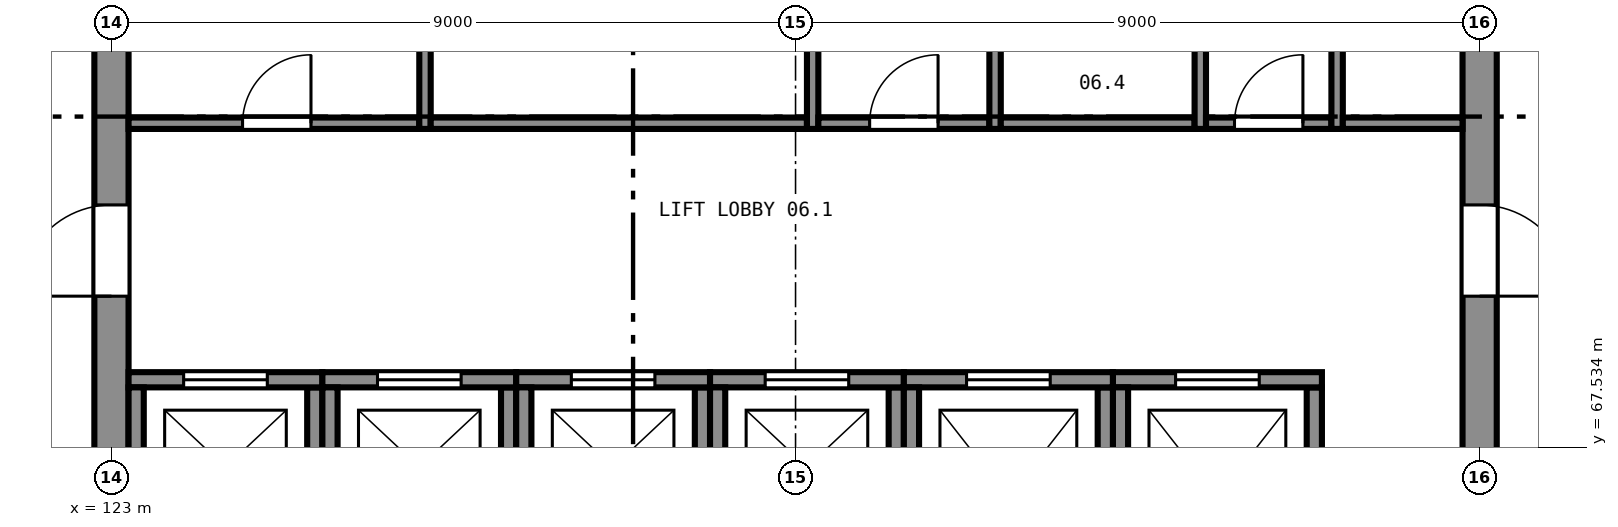
"""IFC4 building model, lengths in metres.
Left out: names, types, materials, properties, quantities, classifications, styles, units other than length and angle.
Written with IfcOpenShell. Run it as: python <this file> out.ifc"""

import sys

from ifc_helpers import new_model, si_unit, direction, frame, frame_2d, origin, place, context, subcontext, project, spatial, rectangle, extrude, element, fill, save


model = new_model("IFC4")
c1 = context("Model", 3, precision=1e-05, world=origin(), true_north=direction((0.0, 1.0)))
c2 = subcontext(c1, "Body", "Model", "MODEL_VIEW")
j1 = project(units=[si_unit("LENGTHUNIT", "METRE"), si_unit("PLANEANGLEUNIT", "RADIAN")], contexts=[c1])
p1 = place(None, origin())
s1 = spatial("IfcSite", under=j1, at=p1, CompositionType="ELEMENT")
p2 = place(p1, origin())
s2 = spatial("IfcBuilding", under=s1, at=p2, CompositionType="ELEMENT")
p3 = place(p2, frame((0.0, 0.0, 25.5)))
s3 = spatial("IfcBuildingStorey", under=s2, at=p3, CompositionType="ELEMENT", Elevation=25.5)
p4 = place(p3, frame((141.0, 65.225, 0.0), z_axis=(0.0, 0.0, 1.0), x_axis=(0.0, 1.0, 0.0)))
e1 = element("IfcWall", 1, at=p4, inside=s3, PredefinedType="SHEAR", context=c2, shape_type="SweptSolid", body=[
    extrude(rectangle(XDim=17.55, YDim=0.45, at=frame_2d((8.775, 0.0))), origin(), (0.0, 0.0, 1.0), 4.0),
])
p5 = place(p4, frame((4.3, 0.0, 0.0)))
e2 = element("IfcOpeningElement", 2, at=p5, cuts=e1, PredefinedType="OPENING", context=c2, shape_type="SweptSolid", body=[
    extrude(rectangle(XDim=1.2, YDim=2.1, at=frame_2d((0.6, 1.05))), frame((0.0, 0.235, 0.0), z_axis=(0.0, -1.0, 0.0), x_axis=(1.0, 0.0, 0.0)), (0.0, 0.0, 1.0), 0.47),
])
p6 = place(p4, frame((12.05, 0.0, 0.0)))
e3 = element("IfcOpeningElement", 3, at=p6, cuts=e1, PredefinedType="OPENING", context=c2, shape_type="SweptSolid", body=[
    extrude(rectangle(XDim=1.2, YDim=2.1, at=frame_2d((0.6, 1.05))), frame((0.0, 0.235, 0.0), z_axis=(0.0, -1.0, 0.0), x_axis=(1.0, 0.0, 0.0)), (0.0, 0.0, 1.0), 0.47),
])
p7 = place(p3, frame((123.0, 82.775, 0.0), z_axis=(0.0, 0.0, 1.0), x_axis=(0.0, -1.0, 0.0)))
e4 = element("IfcWall", 4, at=p7, inside=s3, PredefinedType="SHEAR", context=c2, shape_type="SweptSolid", body=[
    extrude(rectangle(XDim=17.55, YDim=0.45, at=frame_2d((8.775, 0.0))), origin(), (0.0, 0.0, 1.0), 4.0),
])
p8 = place(p7, frame((12.05, 0.0, 0.0)))
e5 = element("IfcOpeningElement", 5, at=p8, cuts=e4, PredefinedType="OPENING", context=c2, shape_type="SweptSolid", body=[
    extrude(rectangle(XDim=1.2, YDim=2.1, at=frame_2d((0.6, 1.05))), frame((0.0, 0.235, 0.0), z_axis=(0.0, -1.0, 0.0), x_axis=(1.0, 0.0, 0.0)), (0.0, 0.0, 1.0), 0.47),
])
p9 = place(p7, frame((4.3, 0.0, 0.0)))
e6 = element("IfcOpeningElement", 6, at=p9, cuts=e4, PredefinedType="OPENING", context=c2, shape_type="SweptSolid", body=[
    extrude(rectangle(XDim=1.2, YDim=2.1, at=frame_2d((0.6, 1.05))), frame((0.0, 0.235, 0.0), z_axis=(0.0, -1.0, 0.0), x_axis=(1.0, 0.0, 0.0)), (0.0, 0.0, 1.0), 0.47),
])
p10 = place(p3, frame((125.675, 66.225, 0.0), z_axis=(0.0, 0.0, 1.0), x_axis=(0.0, 1.0, 0.0)))
e7 = element("IfcWall", 7, at=p10, inside=s3, PredefinedType="SHEAR", context=c2, shape_type="SweptSolid", body=[
    extrude(rectangle(XDim=2.1, YDim=0.2, at=frame_2d((1.05, 0.0))), origin(), (0.0, 0.0, 1.0), 4.0),
])
p11 = place(p3, frame((125.775, 68.425, 0.0), z_axis=(0.0, 0.0, 1.0), x_axis=(-1.0, 0.0, 0.0)))
e8 = element("IfcWall", 8, at=p11, inside=s3, PredefinedType="SHEAR", context=c2, shape_type="SweptSolid", body=[
    extrude(rectangle(XDim=2.55, YDim=0.2, at=frame_2d((1.275, 0.0))), origin(), (0.0, 0.0, 1.0), 4.0),
])
p12 = place(p11, frame((0.725, 0.0, 0.0)))
e9 = element("IfcOpeningElement", 9, at=p12, cuts=e8, PredefinedType="OPENING", context=c2, shape_type="SweptSolid", body=[
    extrude(rectangle(XDim=1.1, YDim=2.1, at=frame_2d((0.55, 1.05))), frame((0.0, 0.11, 0.0), z_axis=(0.0, -1.0, 0.0), x_axis=(1.0, 0.0, 0.0)), (0.0, 0.0, 1.0), 0.22),
])
for number, where, z_axis, x_axis in (
    (10, (123.325, 68.325, 0.0), (0.0, 0.0, 1.0), (0.0, -1.0, 0.0)),
    (11, (128.225, 66.225, 0.0), (0.0, 0.0, 1.0), (0.0, 1.0, 0.0)),
):
    element("IfcWall", number, at=place(p3, frame(where, z_axis=z_axis, x_axis=x_axis)), inside=s3, PredefinedType="SHEAR", context=c2, shape_type="SweptSolid", body=[
        extrude(rectangle(XDim=2.1, YDim=0.2, at=frame_2d((1.05, 0.0))), origin(), (0.0, 0.0, 1.0), 4.0),
    ])
p13 = place(p3, frame((128.325, 68.425, 0.0), z_axis=(0.0, 0.0, 1.0), x_axis=(-1.0, 0.0, 0.0)))
e12 = element("IfcWall", 12, at=p13, inside=s3, PredefinedType="SHEAR", context=c2, shape_type="SweptSolid", body=[
    extrude(rectangle(XDim=2.55, YDim=0.2, at=frame_2d((1.275, 0.0))), origin(), (0.0, 0.0, 1.0), 4.0),
])
p14 = place(p13, frame((0.725, 0.0, 0.0)))
e13 = element("IfcOpeningElement", 13, at=p14, cuts=e12, PredefinedType="OPENING", context=c2, shape_type="SweptSolid", body=[
    extrude(rectangle(XDim=1.1, YDim=2.1, at=frame_2d((0.55, 1.05))), frame((0.0, 0.11, 0.0), z_axis=(0.0, -1.0, 0.0), x_axis=(1.0, 0.0, 0.0)), (0.0, 0.0, 1.0), 0.22),
])
for number, where, z_axis, x_axis in (
    (14, (125.875, 68.325, 0.0), (0.0, 0.0, 1.0), (0.0, -1.0, 0.0)),
    (15, (130.775, 66.225, 0.0), (0.0, 0.0, 1.0), (0.0, 1.0, 0.0)),
):
    element("IfcWall", number, at=place(p3, frame(where, z_axis=z_axis, x_axis=x_axis)), inside=s3, PredefinedType="SHEAR", context=c2, shape_type="SweptSolid", body=[
        extrude(rectangle(XDim=2.1, YDim=0.2, at=frame_2d((1.05, 0.0))), origin(), (0.0, 0.0, 1.0), 4.0),
    ])
p15 = place(p3, frame((130.875, 68.425, 0.0), z_axis=(0.0, 0.0, 1.0), x_axis=(-1.0, 0.0, 0.0)))
e16 = element("IfcWall", 16, at=p15, inside=s3, PredefinedType="SHEAR", context=c2, shape_type="SweptSolid", body=[
    extrude(rectangle(XDim=2.55, YDim=0.2, at=frame_2d((1.275, 0.0))), origin(), (0.0, 0.0, 1.0), 4.0),
])
p16 = place(p15, frame((0.725, 0.0, 0.0)))
e17 = element("IfcOpeningElement", 17, at=p16, cuts=e16, PredefinedType="OPENING", context=c2, shape_type="SweptSolid", body=[
    extrude(rectangle(XDim=1.1, YDim=2.1, at=frame_2d((0.55, 1.05))), frame((0.0, 0.11, 0.0), z_axis=(0.0, -1.0, 0.0), x_axis=(1.0, 0.0, 0.0)), (0.0, 0.0, 1.0), 0.22),
])
for number, where, z_axis, x_axis in (
    (18, (128.425, 68.325, 0.0), (0.0, 0.0, 1.0), (0.0, -1.0, 0.0)),
    (19, (133.325, 66.225, 0.0), (0.0, 0.0, 1.0), (0.0, 1.0, 0.0)),
):
    element("IfcWall", number, at=place(p3, frame(where, z_axis=z_axis, x_axis=x_axis)), inside=s3, PredefinedType="SHEAR", context=c2, shape_type="SweptSolid", body=[
        extrude(rectangle(XDim=2.1, YDim=0.2, at=frame_2d((1.05, 0.0))), origin(), (0.0, 0.0, 1.0), 4.0),
    ])
p17 = place(p3, frame((133.425, 68.425, 0.0), z_axis=(0.0, 0.0, 1.0), x_axis=(-1.0, 0.0, 0.0)))
e20 = element("IfcWall", 20, at=p17, inside=s3, PredefinedType="SHEAR", context=c2, shape_type="SweptSolid", body=[
    extrude(rectangle(XDim=2.55, YDim=0.2, at=frame_2d((1.275, 0.0))), origin(), (0.0, 0.0, 1.0), 4.0),
])
p18 = place(p17, frame((0.725, 0.0, 0.0)))
e21 = element("IfcOpeningElement", 21, at=p18, cuts=e20, PredefinedType="OPENING", context=c2, shape_type="SweptSolid", body=[
    extrude(rectangle(XDim=1.1, YDim=2.1, at=frame_2d((0.55, 1.05))), frame((0.0, 0.11, 0.0), z_axis=(0.0, -1.0, 0.0), x_axis=(1.0, 0.0, 0.0)), (0.0, 0.0, 1.0), 0.22),
])
p19 = place(p3, frame((130.975, 68.325, 0.0), z_axis=(0.0, 0.0, 1.0), x_axis=(0.0, -1.0, 0.0)))
e22 = element("IfcWall", 22, at=p19, inside=s3, PredefinedType="SHEAR", context=c2, shape_type="SweptSolid", body=[
    extrude(rectangle(XDim=2.1, YDim=0.2, at=frame_2d((1.05, 0.0))), origin(), (0.0, 0.0, 1.0), 4.0),
])
p20 = place(p3, frame((136.075, 65.425, 0.0), z_axis=(0.0, 0.0, 1.0), x_axis=(0.0, 1.0, 0.0)))
e23 = element("IfcWall", 23, at=p20, inside=s3, PredefinedType="SHEAR", context=c2, shape_type="SweptSolid", body=[
    extrude(rectangle(XDim=2.9, YDim=0.2, at=frame_2d((1.45, 0.0))), origin(), (0.0, 0.0, 1.0), 4.0),
])
p21 = place(p3, frame((136.175, 68.425, 0.0), z_axis=(0.0, 0.0, 1.0), x_axis=(-1.0, 0.0, 0.0)))
e24 = element("IfcWall", 24, at=p21, inside=s3, PredefinedType="SHEAR", context=c2, shape_type="SweptSolid", body=[
    extrude(rectangle(XDim=2.75, YDim=0.2, at=frame_2d((1.375, 0.0))), origin(), (0.0, 0.0, 1.0), 4.0),
])
p22 = place(p21, frame((0.825, 0.0, 0.0)))
e25 = element("IfcOpeningElement", 25, at=p22, cuts=e24, PredefinedType="OPENING", context=c2, shape_type="SweptSolid", body=[
    extrude(rectangle(XDim=1.1, YDim=2.1, at=frame_2d((0.55, 1.05))), frame((0.0, 0.11, 0.0), z_axis=(0.0, -1.0, 0.0), x_axis=(1.0, 0.0, 0.0)), (0.0, 0.0, 1.0), 0.22),
])
for number, where, z_axis, x_axis in (
    (26, (133.525, 68.325, 0.0), (0.0, 0.0, 1.0), (0.0, -1.0, 0.0)),
    (27, (138.825, 65.425, 0.0), (0.0, 0.0, 1.0), (0.0, 1.0, 0.0)),
):
    element("IfcWall", number, at=place(p3, frame(where, z_axis=z_axis, x_axis=x_axis)), inside=s3, PredefinedType="SHEAR", context=c2, shape_type="SweptSolid", body=[
        extrude(rectangle(XDim=2.9, YDim=0.2, at=frame_2d((1.45, 0.0))), origin(), (0.0, 0.0, 1.0), 4.0),
    ])
p23 = place(p3, frame((138.925, 68.425, 0.0), z_axis=(0.0, 0.0, 1.0), x_axis=(-1.0, 0.0, 0.0)))
e28 = element("IfcWall", 28, at=p23, inside=s3, PredefinedType="SHEAR", context=c2, shape_type="SweptSolid", body=[
    extrude(rectangle(XDim=2.75, YDim=0.2, at=frame_2d((1.375, 0.0))), origin(), (0.0, 0.0, 1.0), 4.0),
])
p24 = place(p23, frame((0.825, 0.0, 0.0)))
e29 = element("IfcOpeningElement", 29, at=p24, cuts=e28, PredefinedType="OPENING", context=c2, shape_type="SweptSolid", body=[
    extrude(rectangle(XDim=1.1, YDim=2.1, at=frame_2d((0.55, 1.05))), frame((0.0, 0.11, 0.0), z_axis=(0.0, -1.0, 0.0), x_axis=(1.0, 0.0, 0.0)), (0.0, 0.0, 1.0), 0.22),
])
p25 = place(p3, frame((136.275, 68.325, 0.0), z_axis=(0.0, 0.0, 1.0), x_axis=(0.0, -1.0, 0.0)))
e30 = element("IfcWall", 30, at=p25, inside=s3, PredefinedType="SHEAR", context=c2, shape_type="SweptSolid", body=[
    extrude(rectangle(XDim=2.9, YDim=0.2, at=frame_2d((1.45, 0.0))), origin(), (0.0, 0.0, 1.0), 4.0),
])
p26 = place(p3, frame((127.125, 71.725, 0.0), z_axis=(0.0, 0.0, 1.0), x_axis=(0.0, 1.0, 0.0)))
e31 = element("IfcWall", 31, at=p26, inside=s3, PredefinedType="PARTITIONING", context=c2, shape_type="SweptSolid", body=[
    extrude(rectangle(XDim=4.55, YDim=0.15, at=frame_2d((2.275, 0.0))), origin(), (0.0, 0.0, 1.0), 3.58),
])
p27 = place(p3, frame((123.225, 71.8, 0.0), z_axis=(0.0, 0.0, 1.0), x_axis=(1.0, 0.0, 0.0)))
e32 = element("IfcWall", 32, at=p27, inside=s3, PredefinedType="PARTITIONING", context=c2, shape_type="SweptSolid", body=[
    extrude(rectangle(XDim=3.825, YDim=0.15, at=frame_2d((1.913, 0.0))), origin(), (0.0, 0.0, 1.0), 3.58),
])
p28 = place(p27, frame((1.5, 0.0, 0.0)))
e33 = element("IfcOpeningElement", 33, at=p28, cuts=e32, PredefinedType="OPENING", context=c2, shape_type="SweptSolid", body=[
    extrude(rectangle(XDim=0.9, YDim=2.1, at=frame_2d((0.45, 1.05))), frame((0.0, 0.085, 0.0), z_axis=(0.0, -1.0, 0.0), x_axis=(1.0, 0.0, 0.0)), (0.0, 0.0, 1.0), 0.17),
])
p29 = place(p3, frame((132.225, 71.725, 0.0), z_axis=(0.0, 0.0, 1.0), x_axis=(0.0, 1.0, 0.0)))
e34 = element("IfcWall", 34, at=p29, inside=s3, PredefinedType="PARTITIONING", context=c2, shape_type="SweptSolid", body=[
    extrude(rectangle(XDim=4.55, YDim=0.15, at=frame_2d((2.275, 0.0))), origin(), (0.0, 0.0, 1.0), 3.58),
])
p30 = place(p3, frame((127.2, 71.8, 0.0), z_axis=(0.0, 0.0, 1.0), x_axis=(1.0, 0.0, 0.0)))
e35 = element("IfcWall", 35, at=p30, inside=s3, PredefinedType="PARTITIONING", context=c2, shape_type="SweptSolid", body=[
    extrude(rectangle(XDim=4.95, YDim=0.15, at=frame_2d((2.475, 0.0))), origin(), (0.0, 0.0, 1.0), 3.58),
])
p31 = place(p3, frame((134.625, 71.725, 0.0), z_axis=(0.0, 0.0, 1.0), x_axis=(0.0, 1.0, 0.0)))
e36 = element("IfcWall", 36, at=p31, inside=s3, PredefinedType="PARTITIONING", context=c2, shape_type="SweptSolid", body=[
    extrude(rectangle(XDim=4.55, YDim=0.15, at=frame_2d((2.275, 0.0))), origin(), (0.0, 0.0, 1.0), 3.58),
])
p32 = place(p3, frame((132.3, 71.8, 0.0), z_axis=(0.0, 0.0, 1.0), x_axis=(1.0, 0.0, 0.0)))
e37 = element("IfcWall", 37, at=p32, inside=s3, PredefinedType="PARTITIONING", context=c2, shape_type="SweptSolid", body=[
    extrude(rectangle(XDim=2.25, YDim=0.15, at=frame_2d((1.125, 0.0))), origin(), (0.0, 0.0, 1.0), 3.58),
])
p33 = place(p32, frame((0.675, 0.0, 0.0)))
e38 = element("IfcOpeningElement", 38, at=p33, cuts=e37, PredefinedType="OPENING", context=c2, shape_type="SweptSolid", body=[
    extrude(rectangle(XDim=0.9, YDim=2.1, at=frame_2d((0.45, 1.05))), frame((0.0, 0.085, 0.0), z_axis=(0.0, -1.0, 0.0), x_axis=(1.0, 0.0, 0.0)), (0.0, 0.0, 1.0), 0.17),
])
p34 = place(p3, frame((137.325, 71.725, 0.0), z_axis=(0.0, 0.0, 1.0), x_axis=(0.0, 1.0, 0.0)))
e39 = element("IfcWall", 39, at=p34, inside=s3, PredefinedType="PARTITIONING", context=c2, shape_type="SweptSolid", body=[
    extrude(rectangle(XDim=4.55, YDim=0.15, at=frame_2d((2.275, 0.0))), origin(), (0.0, 0.0, 1.0), 3.58),
])
p35 = place(p3, frame((134.7, 71.8, 0.0), z_axis=(0.0, 0.0, 1.0), x_axis=(1.0, 0.0, 0.0)))
e40 = element("IfcWall", 40, at=p35, inside=s3, PredefinedType="PARTITIONING", context=c2, shape_type="SweptSolid", body=[
    extrude(rectangle(XDim=2.55, YDim=0.15, at=frame_2d((1.275, 0.0))), origin(), (0.0, 0.0, 1.0), 3.58),
])
p36 = place(p3, frame((139.125, 71.725, 0.0), z_axis=(0.0, 0.0, 1.0), x_axis=(0.0, 1.0, 0.0)))
e41 = element("IfcWall", 41, at=p36, inside=s3, PredefinedType="PARTITIONING", context=c2, shape_type="SweptSolid", body=[
    extrude(rectangle(XDim=4.55, YDim=0.15, at=frame_2d((2.275, 0.0))), origin(), (0.0, 0.0, 1.0), 3.58),
])
p37 = place(p3, frame((137.4, 71.8, 0.0), z_axis=(0.0, 0.0, 1.0), x_axis=(1.0, 0.0, 0.0)))
e42 = element("IfcWall", 42, at=p37, inside=s3, PredefinedType="PARTITIONING", context=c2, shape_type="SweptSolid", body=[
    extrude(rectangle(XDim=1.65, YDim=0.15, at=frame_2d((0.825, 0.0))), origin(), (0.0, 0.0, 1.0), 3.58),
])
p38 = place(p37, frame((0.375, 0.0, 0.0)))
e43 = element("IfcOpeningElement", 43, at=p38, cuts=e42, PredefinedType="OPENING", context=c2, shape_type="SweptSolid", body=[
    extrude(rectangle(XDim=0.9, YDim=2.1, at=frame_2d((0.45, 1.05))), frame((0.0, 0.085, 0.0), z_axis=(0.0, -1.0, 0.0), x_axis=(1.0, 0.0, 0.0)), (0.0, 0.0, 1.0), 0.17),
])
p39 = place(p3, frame((139.2, 71.8, 0.0), z_axis=(0.0, 0.0, 1.0), x_axis=(1.0, 0.0, 0.0)))
e44 = element("IfcWall", 44, at=p39, inside=s3, PredefinedType="PARTITIONING", context=c2, shape_type="SweptSolid", body=[
    extrude(rectangle(XDim=1.575, YDim=0.15, at=frame_2d((0.788, 0.0))), origin(), (0.0, 0.0, 1.0), 3.58),
])
p40 = place(p12, origin())
e45 = element("IfcDoor", 45, at=p40, inside=s3, OperationType="SLIDING_TO_LEFT", PredefinedType="DOOR", context=c2, shape_type="SweptSolid", body=[
    extrude(rectangle(XDim=1.1, YDim=2.1, at=frame_2d((0.55, 1.05))), frame((0.0, 0.025, 0.0), z_axis=(0.0, -1.0, 0.0), x_axis=(1.0, 0.0, 0.0)), (0.0, 0.0, 1.0), 0.05),
])
fill(e9, e45)
p41 = place(p14, origin())
e46 = element("IfcDoor", 46, at=p41, inside=s3, OperationType="SLIDING_TO_LEFT", PredefinedType="DOOR", context=c2, shape_type="SweptSolid", body=[
    extrude(rectangle(XDim=1.1, YDim=2.1, at=frame_2d((0.55, 1.05))), frame((0.0, 0.025, 0.0), z_axis=(0.0, -1.0, 0.0), x_axis=(1.0, 0.0, 0.0)), (0.0, 0.0, 1.0), 0.05),
])
fill(e13, e46)
p42 = place(p16, origin())
e47 = element("IfcDoor", 47, at=p42, inside=s3, OperationType="SLIDING_TO_LEFT", PredefinedType="DOOR", context=c2, shape_type="SweptSolid", body=[
    extrude(rectangle(XDim=1.1, YDim=2.1, at=frame_2d((0.55, 1.05))), frame((0.0, 0.025, 0.0), z_axis=(0.0, -1.0, 0.0), x_axis=(1.0, 0.0, 0.0)), (0.0, 0.0, 1.0), 0.05),
])
fill(e17, e47)
p43 = place(p18, origin())
e48 = element("IfcDoor", 48, at=p43, inside=s3, OperationType="SLIDING_TO_LEFT", PredefinedType="DOOR", context=c2, shape_type="SweptSolid", body=[
    extrude(rectangle(XDim=1.1, YDim=2.1, at=frame_2d((0.55, 1.05))), frame((0.0, 0.025, 0.0), z_axis=(0.0, -1.0, 0.0), x_axis=(1.0, 0.0, 0.0)), (0.0, 0.0, 1.0), 0.05),
])
fill(e21, e48)
p44 = place(p22, origin())
e49 = element("IfcDoor", 49, at=p44, inside=s3, OperationType="SLIDING_TO_LEFT", PredefinedType="DOOR", context=c2, shape_type="SweptSolid", body=[
    extrude(rectangle(XDim=1.1, YDim=2.1, at=frame_2d((0.55, 1.05))), frame((0.0, 0.025, 0.0), z_axis=(0.0, -1.0, 0.0), x_axis=(1.0, 0.0, 0.0)), (0.0, 0.0, 1.0), 0.05),
])
fill(e25, e49)
p45 = place(p24, origin())
e50 = element("IfcDoor", 50, at=p45, inside=s3, OperationType="SLIDING_TO_LEFT", PredefinedType="DOOR", context=c2, shape_type="SweptSolid", body=[
    extrude(rectangle(XDim=1.1, YDim=2.1, at=frame_2d((0.55, 1.05))), frame((0.0, 0.025, 0.0), z_axis=(0.0, -1.0, 0.0), x_axis=(1.0, 0.0, 0.0)), (0.0, 0.0, 1.0), 0.05),
])
fill(e29, e50)
p46 = place(p8, frame((1.2, 0.0, 0.0), z_axis=(0.0, 0.0, 1.0), x_axis=(-1.0, 0.0, 0.0)))
e51 = element("IfcDoor", 51, at=p46, inside=s3, OperationType="SINGLE_SWING_RIGHT", PredefinedType="DOOR", context=c2, shape_type="SweptSolid", body=[
    extrude(rectangle(XDim=1.2, YDim=2.1, at=frame_2d((0.6, 1.05))), frame((0.0, 0.025, 0.0), z_axis=(0.0, -1.0, 0.0), x_axis=(1.0, 0.0, 0.0)), (0.0, 0.0, 1.0), 0.05),
])
fill(e5, e51)
p47 = place(p5, frame((1.2, 0.0, 0.0), z_axis=(0.0, 0.0, 1.0), x_axis=(-1.0, 0.0, 0.0)))
e52 = element("IfcDoor", 52, at=p47, inside=s3, OperationType="SINGLE_SWING_LEFT", PredefinedType="DOOR", context=c2, shape_type="SweptSolid", body=[
    extrude(rectangle(XDim=1.2, YDim=2.1, at=frame_2d((0.6, 1.05))), frame((0.0, 0.025, 0.0), z_axis=(0.0, -1.0, 0.0), x_axis=(1.0, 0.0, 0.0)), (0.0, 0.0, 1.0), 0.05),
])
fill(e2, e52)
p48 = place(p28, origin())
e53 = element("IfcDoor", 53, at=p48, inside=s3, OperationType="SINGLE_SWING_LEFT", PredefinedType="DOOR", context=c2, shape_type="SweptSolid", body=[
    extrude(rectangle(XDim=0.9, YDim=2.1, at=frame_2d((0.45, 1.05))), frame((0.0, 0.025, 0.0), z_axis=(0.0, -1.0, 0.0), x_axis=(1.0, 0.0, 0.0)), (0.0, 0.0, 1.0), 0.05),
])
fill(e33, e53)
p49 = place(p33, origin())
e54 = element("IfcDoor", 54, at=p49, inside=s3, OperationType="SINGLE_SWING_LEFT", PredefinedType="DOOR", context=c2, shape_type="SweptSolid", body=[
    extrude(rectangle(XDim=0.9, YDim=2.1, at=frame_2d((0.45, 1.05))), frame((0.0, 0.025, 0.0), z_axis=(0.0, -1.0, 0.0), x_axis=(1.0, 0.0, 0.0)), (0.0, 0.0, 1.0), 0.05),
])
fill(e38, e54)
p50 = place(p38, origin())
e55 = element("IfcDoor", 55, at=p50, inside=s3, OperationType="SINGLE_SWING_LEFT", PredefinedType="DOOR", context=c2, shape_type="SweptSolid", body=[
    extrude(rectangle(XDim=0.9, YDim=2.1, at=frame_2d((0.45, 1.05))), frame((0.0, 0.025, 0.0), z_axis=(0.0, -1.0, 0.0), x_axis=(1.0, 0.0, 0.0)), (0.0, 0.0, 1.0), 0.05),
])
fill(e43, e55)
save(model, sys.argv[1])
